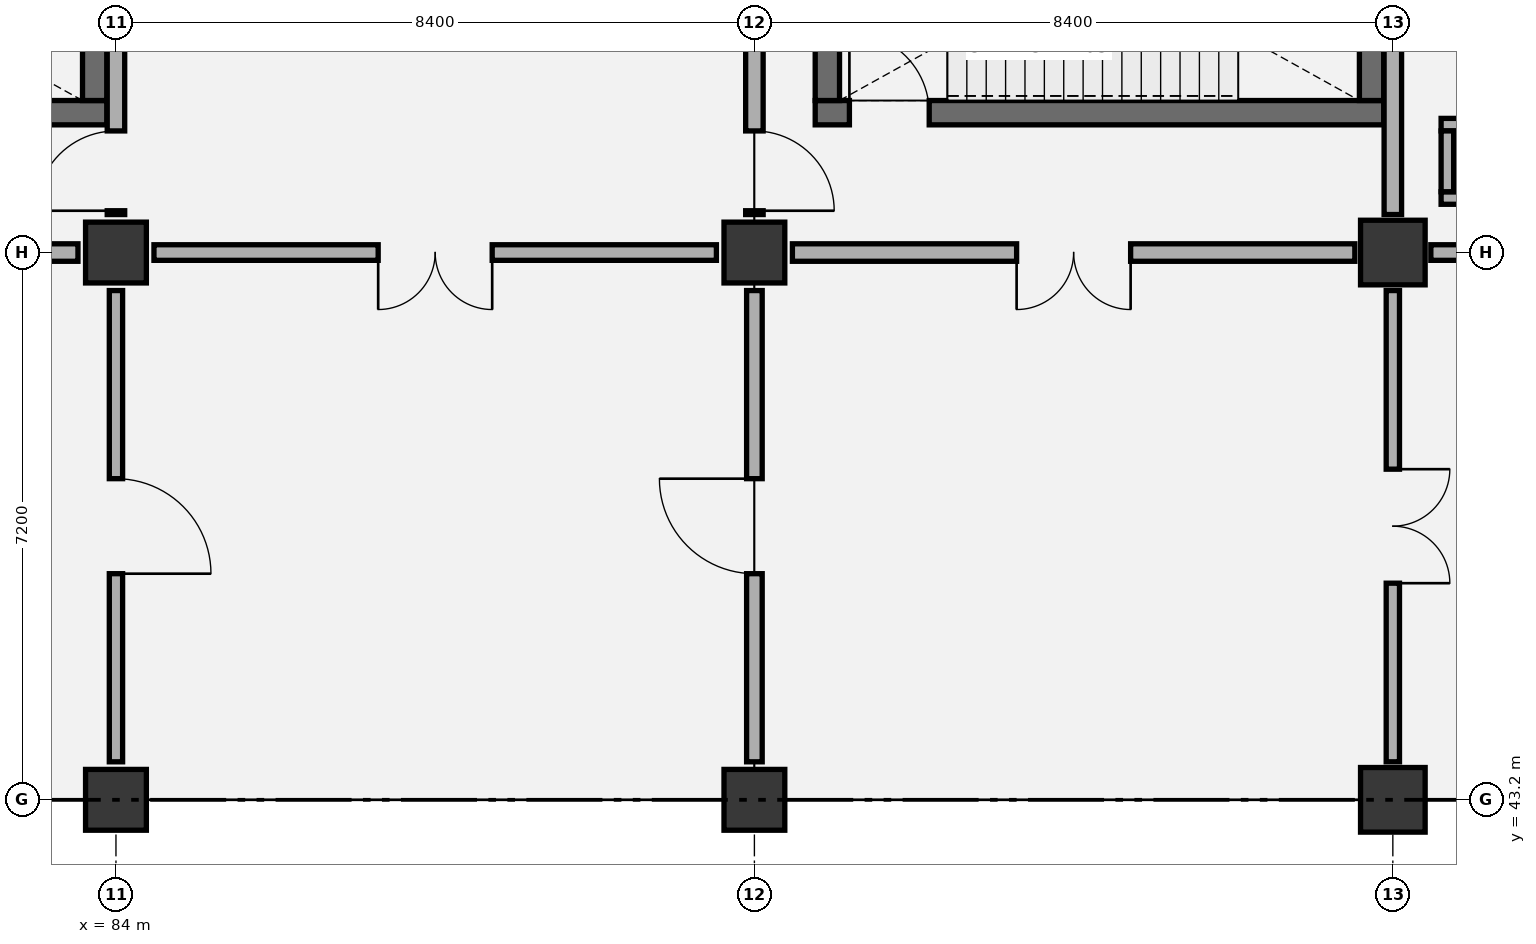
"""IFC4 building model, lengths in metres.
Left out: names, types, materials, properties, quantities, classifications, styles, units other than length and angle.
Written with IfcOpenShell. Run it as: python <this file> out.ifc"""

import sys

from ifc_helpers import new_model, si_unit, direction, frame, frame_2d, origin, origin_2d, place, context, subcontext, project, spatial, rectangle, extrude, element, fill, save


model = new_model("IFC4")
c1 = context("Model", 3, precision=1e-05, world=origin(), true_north=direction((0.0, 1.0)))
c2 = subcontext(c1, "Body", "Model", "MODEL_VIEW")
j1 = project(units=[si_unit("LENGTHUNIT", "METRE"), si_unit("PLANEANGLEUNIT", "RADIAN")], contexts=[c1])
p1 = place(None, origin())
s1 = spatial("IfcSite", under=j1, at=p1, CompositionType="ELEMENT")
p2 = place(p1, origin())
s2 = spatial("IfcBuilding", under=s1, at=p2, CompositionType="ELEMENT")
p3 = place(p2, frame((0.0, 0.0, 16.8)))
s3 = spatial("IfcBuildingStorey", under=s2, at=p3, CompositionType="ELEMENT", Elevation=16.8)
for number, where, z_axis, x_axis in (
    (1, (84.0, 43.2, 0.0), (0.0, 0.0, 1.0), (1.0, 0.0, 0.0)),
    (2, (84.0, 50.4, 0.0), (0.0, 0.0, 1.0), (1.0, 0.0, 0.0)),
    (3, (92.4, 43.2, 0.0), (0.0, 0.0, 1.0), (1.0, 0.0, 0.0)),
    (4, (92.4, 50.4, 0.0), (0.0, 0.0, 1.0), (1.0, 0.0, 0.0)),
):
    element("IfcColumn", number, at=place(p3, frame(where, z_axis=z_axis, x_axis=x_axis)), inside=s3, PredefinedType="COLUMN", context=c2, shape_type="SweptSolid", body=[
        extrude(rectangle(XDim=0.8, YDim=0.8, at=origin_2d()), origin(), (0.0, 0.0, 1.0), 5.4),
    ])
for number, where, z_axis, x_axis in (
    (5, (100.8, 43.2, 0.0), (0.0, 0.0, 1.0), (1.0, 0.0, 0.0)),
    (6, (100.8, 50.4, 0.0), (0.0, 0.0, 1.0), (1.0, 0.0, 0.0)),
):
    element("IfcColumn", number, at=place(p3, frame(where, z_axis=z_axis, x_axis=x_axis)), inside=s3, PredefinedType="COLUMN", context=c2, shape_type="SweptSolid", body=[
        extrude(rectangle(XDim=0.85, YDim=0.85, at=origin_2d()), origin(), (0.0, 0.0, 1.0), 5.4),
    ])
p4 = place(p3, frame((76.4, 52.24, 0.0), z_axis=(0.0, 0.0, 1.0), x_axis=(1.0, 0.0, 0.0)))
e7 = element("IfcWall", 7, at=p4, inside=s3, PredefinedType="SHEAR", context=c2, shape_type="SweptSolid", body=[
    extrude(rectangle(XDim=7.48, YDim=0.32, at=frame_2d((3.74, 0.0))), origin(), (0.0, 0.0, 1.0), 4.95),
])
p5 = place(p4, frame((0.45, 0.0, 0.0)))
e8 = element("IfcOpeningElement", 8, at=p5, cuts=e7, PredefinedType="OPENING", context=c2, shape_type="SweptSolid", body=[
    extrude(rectangle(XDim=1.05, YDim=2.15, at=frame_2d((0.525, 1.075))), frame((0.0, 0.17, 0.0), z_axis=(0.0, -1.0, 0.0), x_axis=(1.0, 0.0, 0.0)), (0.0, 0.0, 1.0), 0.34),
])
p6 = place(p3, frame((83.72, 52.4, 0.0), z_axis=(0.0, 0.0, 1.0), x_axis=(0.0, 1.0, 0.0)))
e9 = element("IfcWall", 9, at=p6, inside=s3, PredefinedType="SHEAR", context=c2, shape_type="SweptSolid", body=[
    extrude(rectangle(XDim=3.8, YDim=0.32, at=frame_2d((1.9, 0.0))), origin(), (0.0, 0.0, 1.0), 4.95),
])
p7 = place(p3, frame((93.2, 52.24, 0.0), z_axis=(0.0, 0.0, 1.0), x_axis=(1.0, 0.0, 0.0)))
e10 = element("IfcWall", 10, at=p7, inside=s3, PredefinedType="SHEAR", context=c2, shape_type="SweptSolid", body=[
    extrude(rectangle(XDim=7.48, YDim=0.32, at=frame_2d((3.74, 0.0))), origin(), (0.0, 0.0, 1.0), 4.95),
])
p8 = place(p7, frame((0.45, 0.0, 0.0)))
e11 = element("IfcOpeningElement", 11, at=p8, cuts=e10, PredefinedType="OPENING", context=c2, shape_type="SweptSolid", body=[
    extrude(rectangle(XDim=1.05, YDim=2.15, at=frame_2d((0.525, 1.075))), frame((0.0, 0.17, 0.0), z_axis=(0.0, -1.0, 0.0), x_axis=(1.0, 0.0, 0.0)), (0.0, 0.0, 1.0), 0.34),
])
for number, where, z_axis, x_axis in (
    (12, (93.36, 52.4, 0.0), (0.0, 0.0, 1.0), (0.0, 1.0, 0.0)),
    (13, (100.52, 52.4, 0.0), (0.0, 0.0, 1.0), (0.0, 1.0, 0.0)),
):
    element("IfcWall", number, at=place(p3, frame(where, z_axis=z_axis, x_axis=x_axis)), inside=s3, PredefinedType="SHEAR", context=c2, shape_type="SweptSolid", body=[
        extrude(rectangle(XDim=3.8, YDim=0.32, at=frame_2d((1.9, 0.0))), origin(), (0.0, 0.0, 1.0), 4.95),
    ])
for number, where, z_axis, x_axis in (
    (14, (101.435, 51.117, 0.0), (0.0, 0.0, 1.0), (1.0, 0.0, 0.0)),
    (15, (101.435, 52.083, 0.0), (0.0, 0.0, 1.0), (1.0, 0.0, 0.0)),
):
    element("IfcWall", number, at=place(p3, frame(where, z_axis=z_axis, x_axis=x_axis)), inside=s3, PredefinedType="PARTITIONING", context=c2, shape_type="SweptSolid", body=[
        extrude(rectangle(XDim=1.43, YDim=0.165, at=frame_2d((0.715, 0.0))), origin(), (0.0, 0.0, 1.0), 4.825),
    ])
p9 = place(p3, frame((101.518, 51.2, 0.0), z_axis=(0.0, 0.0, 1.0), x_axis=(0.0, 1.0, 0.0)))
e16 = element("IfcWall", 16, at=p9, inside=s3, PredefinedType="PARTITIONING", context=c2, shape_type="SweptSolid", body=[
    extrude(rectangle(XDim=0.8, YDim=0.165, at=frame_2d((0.4, 0.0))), origin(), (0.0, 0.0, 1.0), 4.825),
])
p10 = place(p3, frame((84.0, 43.7, 0.0), z_axis=(0.0, 0.0, 1.0), x_axis=(0.0, 1.0, 0.0)))
e17 = element("IfcWall", 17, at=p10, inside=s3, PredefinedType="PARTITIONING", context=c2, shape_type="SweptSolid", body=[
    extrude(rectangle(XDim=6.2, YDim=0.175, at=frame_2d((3.1, 0.0))), origin(), (0.0, 0.0, 1.0), 4.245),
])
p11 = place(p10, frame((2.475, 0.0, 0.0)))
e18 = element("IfcOpeningElement", 18, at=p11, cuts=e17, PredefinedType="OPENING", context=c2, shape_type="SweptSolid", body=[
    extrude(rectangle(XDim=1.25, YDim=2.1, at=frame_2d((0.625, 1.05))), frame((0.0, 0.097, 0.0), z_axis=(0.0, -1.0, 0.0), x_axis=(1.0, 0.0, 0.0)), (0.0, 0.0, 1.0), 0.195),
])
p12 = place(p3, frame((76.1, 50.4, 0.0), z_axis=(0.0, 0.0, 1.0), x_axis=(1.0, 0.0, 0.0)))
e19 = element("IfcWall", 19, at=p12, inside=s3, PredefinedType="PARTITIONING", context=c2, shape_type="SweptSolid", body=[
    extrude(rectangle(XDim=7.4, YDim=0.23, at=frame_2d((3.7, 0.0))), origin(), (0.0, 0.0, 1.0), 4.195),
])
p13 = place(p12, frame((2.95, 0.0, 0.0)))
e20 = element("IfcOpeningElement", 20, at=p13, cuts=e19, PredefinedType="OPENING", context=c2, shape_type="SweptSolid", body=[
    extrude(rectangle(XDim=1.5, YDim=2.15, at=frame_2d((0.75, 1.075))), frame((0.0, 0.125, 0.0), z_axis=(0.0, -1.0, 0.0), x_axis=(1.0, 0.0, 0.0)), (0.0, 0.0, 1.0), 0.25),
])
p14 = place(p3, frame((84.0, 50.9, 0.0), z_axis=(0.0, 0.0, 1.0), x_axis=(0.0, 1.0, 0.0)))
e21 = element("IfcWall", 21, at=p14, inside=s3, PredefinedType="PARTITIONING", context=c2, shape_type="SweptSolid", body=[
    extrude(rectangle(XDim=6.2, YDim=0.23, at=frame_2d((3.1, 0.0))), origin(), (0.0, 0.0, 1.0), 4.655),
])
p15 = place(p14, frame((0.05, 0.0, 0.0)))
e22 = element("IfcOpeningElement", 22, at=p15, cuts=e21, PredefinedType="OPENING", context=c2, shape_type="SweptSolid", body=[
    extrude(rectangle(XDim=1.05, YDim=2.15, at=frame_2d((0.525, 1.075))), frame((0.0, 0.125, 0.0), z_axis=(0.0, -1.0, 0.0), x_axis=(1.0, 0.0, 0.0)), (0.0, 0.0, 1.0), 0.25),
])
p16 = place(p3, frame((92.4, 43.7, 0.0), z_axis=(0.0, 0.0, 1.0), x_axis=(0.0, 1.0, 0.0)))
e23 = element("IfcWall", 23, at=p16, inside=s3, PredefinedType="PARTITIONING", context=c2, shape_type="SweptSolid", body=[
    extrude(rectangle(XDim=6.2, YDim=0.205, at=frame_2d((3.1, 0.0))), origin(), (0.0, 0.0, 1.0), 4.655),
])
p17 = place(p16, frame((2.475, 0.0, 0.0)))
e24 = element("IfcOpeningElement", 24, at=p17, cuts=e23, PredefinedType="OPENING", context=c2, shape_type="SweptSolid", body=[
    extrude(rectangle(XDim=1.25, YDim=2.1, at=frame_2d((0.625, 1.05))), frame((0.0, 0.113, 0.0), z_axis=(0.0, -1.0, 0.0), x_axis=(1.0, 0.0, 0.0)), (0.0, 0.0, 1.0), 0.225),
])
p18 = place(p3, frame((84.5, 50.4, 0.0), z_axis=(0.0, 0.0, 1.0), x_axis=(1.0, 0.0, 0.0)))
e25 = element("IfcWall", 25, at=p18, inside=s3, PredefinedType="PARTITIONING", context=c2, shape_type="SweptSolid", body=[
    extrude(rectangle(XDim=7.4, YDim=0.205, at=frame_2d((3.7, 0.0))), origin(), (0.0, 0.0, 1.0), 4.195),
])
p19 = place(p18, frame((2.95, 0.0, 0.0)))
e26 = element("IfcOpeningElement", 26, at=p19, cuts=e25, PredefinedType="OPENING", context=c2, shape_type="SweptSolid", body=[
    extrude(rectangle(XDim=1.5, YDim=2.2, at=frame_2d((0.75, 1.1))), frame((0.0, 0.113, 0.0), z_axis=(0.0, -1.0, 0.0), x_axis=(1.0, 0.0, 0.0)), (0.0, 0.0, 1.0), 0.225),
])
p20 = place(p3, frame((92.4, 50.9, 0.0), z_axis=(0.0, 0.0, 1.0), x_axis=(0.0, 1.0, 0.0)))
e27 = element("IfcWall", 27, at=p20, inside=s3, PredefinedType="PARTITIONING", context=c2, shape_type="SweptSolid", body=[
    extrude(rectangle(XDim=6.2, YDim=0.23, at=frame_2d((3.1, 0.0))), origin(), (0.0, 0.0, 1.0), 4.245),
])
p21 = place(p20, frame((0.05, 0.0, 0.0)))
e28 = element("IfcOpeningElement", 28, at=p21, cuts=e27, PredefinedType="OPENING", context=c2, shape_type="SweptSolid", body=[
    extrude(rectangle(XDim=1.05, YDim=2.15, at=frame_2d((0.525, 1.075))), frame((0.0, 0.125, 0.0), z_axis=(0.0, -1.0, 0.0), x_axis=(1.0, 0.0, 0.0)), (0.0, 0.0, 1.0), 0.25),
])
p22 = place(p3, frame((100.8, 43.7, 0.0), z_axis=(0.0, 0.0, 1.0), x_axis=(0.0, 1.0, 0.0)))
e29 = element("IfcWall", 29, at=p22, inside=s3, PredefinedType="PARTITIONING", context=c2, shape_type="SweptSolid", body=[
    extrude(rectangle(XDim=6.2, YDim=0.175, at=frame_2d((3.1, 0.0))), origin(), (0.0, 0.0, 1.0), 4.245),
])
p23 = place(p22, frame((2.35, 0.0, 0.0)))
e30 = element("IfcOpeningElement", 30, at=p23, cuts=e29, PredefinedType="OPENING", context=c2, shape_type="SweptSolid", body=[
    extrude(rectangle(XDim=1.5, YDim=2.2, at=frame_2d((0.75, 1.1))), frame((0.0, 0.097, 0.0), z_axis=(0.0, -1.0, 0.0), x_axis=(1.0, 0.0, 0.0)), (0.0, 0.0, 1.0), 0.195),
])
p24 = place(p3, frame((92.9, 50.4, 0.0), z_axis=(0.0, 0.0, 1.0), x_axis=(1.0, 0.0, 0.0)))
e31 = element("IfcWall", 31, at=p24, inside=s3, PredefinedType="PARTITIONING", context=c2, shape_type="SweptSolid", body=[
    extrude(rectangle(XDim=7.4, YDim=0.23, at=frame_2d((3.7, 0.0))), origin(), (0.0, 0.0, 1.0), 4.195),
])
p25 = place(p24, frame((2.95, 0.0, 0.0)))
e32 = element("IfcOpeningElement", 32, at=p25, cuts=e31, PredefinedType="OPENING", context=c2, shape_type="SweptSolid", body=[
    extrude(rectangle(XDim=1.5, YDim=2.15, at=frame_2d((0.75, 1.075))), frame((0.0, 0.125, 0.0), z_axis=(0.0, -1.0, 0.0), x_axis=(1.0, 0.0, 0.0)), (0.0, 0.0, 1.0), 0.25),
])
p26 = place(p3, frame((100.8, 50.9, 0.0), z_axis=(0.0, 0.0, 1.0), x_axis=(0.0, 1.0, 0.0)))
e33 = element("IfcWall", 33, at=p26, inside=s3, PredefinedType="PARTITIONING", context=c2, shape_type="SweptSolid", body=[
    extrude(rectangle(XDim=6.2, YDim=0.23, at=frame_2d((3.1, 0.0))), origin(), (0.0, 0.0, 1.0), 4.445),
])
p27 = place(p3, frame((101.3, 50.4, 0.0), z_axis=(0.0, 0.0, 1.0), x_axis=(1.0, 0.0, 0.0)))
e34 = element("IfcWall", 34, at=p27, inside=s3, PredefinedType="PARTITIONING", context=c2, shape_type="SweptSolid", body=[
    extrude(rectangle(XDim=7.4, YDim=0.205, at=frame_2d((3.7, 0.0))), origin(), (0.0, 0.0, 1.0), 4.195),
])
p28 = place(p27, frame((3.025, 0.0, 0.0)))
e35 = element("IfcOpeningElement", 35, at=p28, cuts=e34, PredefinedType="OPENING", context=c2, shape_type="SweptSolid", body=[
    extrude(rectangle(XDim=1.35, YDim=2.15, at=frame_2d((0.675, 1.075))), frame((0.0, 0.113, 0.0), z_axis=(0.0, -1.0, 0.0), x_axis=(1.0, 0.0, 0.0)), (0.0, 0.0, 1.0), 0.225),
])
p29 = place(p8, origin())
e36 = element("IfcDoor", 36, at=p29, inside=s3, OperationType="SINGLE_SWING_LEFT", PredefinedType="DOOR", context=c2, shape_type="SweptSolid", body=[
    extrude(rectangle(XDim=1.05, YDim=2.15, at=frame_2d((0.525, 1.075))), frame((0.0, 0.025, 0.0), z_axis=(0.0, -1.0, 0.0), x_axis=(1.0, 0.0, 0.0)), (0.0, 0.0, 1.0), 0.05),
])
fill(e11, e36)
p30 = place(p11, frame((1.25, 0.0, 0.0), z_axis=(0.0, 0.0, 1.0), x_axis=(-1.0, 0.0, 0.0)))
e37 = element("IfcDoor", 37, at=p30, inside=s3, OperationType="SINGLE_SWING_RIGHT", PredefinedType="DOOR", context=c2, shape_type="SweptSolid", body=[
    extrude(rectangle(XDim=1.25, YDim=2.1, at=frame_2d((0.625, 1.05))), frame((0.0, 0.025, 0.0), z_axis=(0.0, -1.0, 0.0), x_axis=(1.0, 0.0, 0.0)), (0.0, 0.0, 1.0), 0.05),
])
fill(e18, e37)
p31 = place(p15, origin())
e38 = element("IfcDoor", 38, at=p31, inside=s3, OperationType="SINGLE_SWING_LEFT", PredefinedType="DOOR", context=c2, shape_type="SweptSolid", body=[
    extrude(rectangle(XDim=1.05, YDim=2.15, at=frame_2d((0.525, 1.075))), frame((0.0, 0.025, 0.0), z_axis=(0.0, -1.0, 0.0), x_axis=(1.0, 0.0, 0.0)), (0.0, 0.0, 1.0), 0.05),
])
fill(e22, e38)
p32 = place(p17, origin())
e39 = element("IfcDoor", 39, at=p32, inside=s3, OperationType="SINGLE_SWING_RIGHT", PredefinedType="DOOR", context=c2, shape_type="SweptSolid", body=[
    extrude(rectangle(XDim=1.25, YDim=2.1, at=frame_2d((0.625, 1.05))), frame((0.0, 0.025, 0.0), z_axis=(0.0, -1.0, 0.0), x_axis=(1.0, 0.0, 0.0)), (0.0, 0.0, 1.0), 0.05),
])
fill(e24, e39)
p33 = place(p19, frame((1.5, 0.0, 0.0), z_axis=(0.0, 0.0, 1.0), x_axis=(-1.0, 0.0, 0.0)))
e40 = element("IfcDoor", 40, at=p33, inside=s3, OperationType="DOUBLE_DOOR_SINGLE_SWING", PredefinedType="DOOR", context=c2, shape_type="SweptSolid", body=[
    extrude(rectangle(XDim=1.5, YDim=2.2, at=frame_2d((0.75, 1.1))), frame((0.0, 0.025, 0.0), z_axis=(0.0, -1.0, 0.0), x_axis=(1.0, 0.0, 0.0)), (0.0, 0.0, 1.0), 0.05),
])
fill(e26, e40)
p34 = place(p21, frame((1.05, 0.0, 0.0), z_axis=(0.0, 0.0, 1.0), x_axis=(-1.0, 0.0, 0.0)))
e41 = element("IfcDoor", 41, at=p34, inside=s3, OperationType="SINGLE_SWING_RIGHT", PredefinedType="DOOR", context=c2, shape_type="SweptSolid", body=[
    extrude(rectangle(XDim=1.05, YDim=2.15, at=frame_2d((0.525, 1.075))), frame((0.0, 0.025, 0.0), z_axis=(0.0, -1.0, 0.0), x_axis=(1.0, 0.0, 0.0)), (0.0, 0.0, 1.0), 0.05),
])
fill(e28, e41)
p35 = place(p23, frame((1.5, 0.0, 0.0), z_axis=(0.0, 0.0, 1.0), x_axis=(-1.0, 0.0, 0.0)))
e42 = element("IfcDoor", 42, at=p35, inside=s3, OperationType="DOUBLE_DOOR_SINGLE_SWING", PredefinedType="DOOR", context=c2, shape_type="SweptSolid", body=[
    extrude(rectangle(XDim=1.5, YDim=2.2, at=frame_2d((0.75, 1.1))), frame((0.0, 0.025, 0.0), z_axis=(0.0, -1.0, 0.0), x_axis=(1.0, 0.0, 0.0)), (0.0, 0.0, 1.0), 0.05),
])
fill(e30, e42)
p36 = place(p25, frame((1.5, 0.0, 0.0), z_axis=(0.0, 0.0, 1.0), x_axis=(-1.0, 0.0, 0.0)))
e43 = element("IfcDoor", 43, at=p36, inside=s3, OperationType="DOUBLE_DOOR_SINGLE_SWING", PredefinedType="DOOR", context=c2, shape_type="SweptSolid", body=[
    extrude(rectangle(XDim=1.5, YDim=2.15, at=frame_2d((0.75, 1.075))), frame((0.0, 0.025, 0.0), z_axis=(0.0, -1.0, 0.0), x_axis=(1.0, 0.0, 0.0)), (0.0, 0.0, 1.0), 0.05),
])
fill(e32, e43)
save(model, sys.argv[1])
